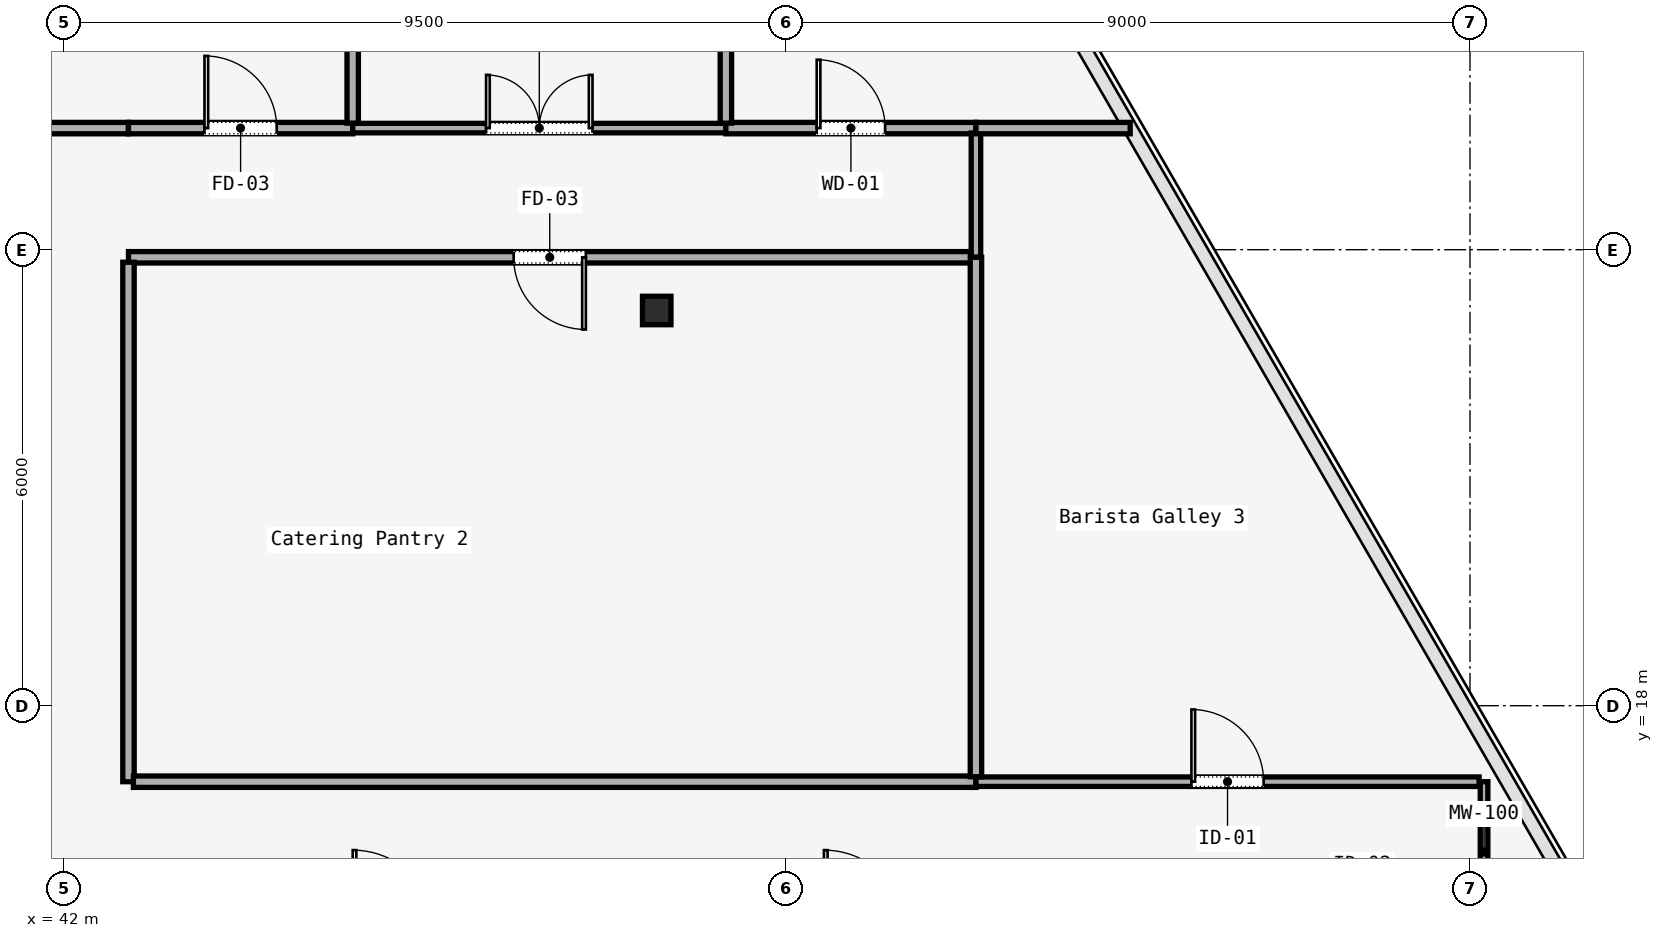
"""IFC4 building model, lengths in metres.
Left out: names, types, materials, properties, quantities, classifications, styles, units other than length and angle.
Written with IfcOpenShell. Run it as: python <this file> out.ifc"""

import sys

from ifc_helpers import new_model, si_unit, direction, frame, frame_2d, origin, origin_2d, place, context, subcontext, project, spatial, rectangle, i_section, extrude, element, fill, save


model = new_model("IFC4")
c1 = context("Model", 3, precision=1e-05, world=origin(), true_north=direction((0.0, 1.0)))
c2 = subcontext(c1, "Body", "Model", "MODEL_VIEW")
j1 = project(units=[si_unit("LENGTHUNIT", "METRE"), si_unit("PLANEANGLEUNIT", "RADIAN")], contexts=[c1])
p1 = place(None, origin())
s1 = spatial("IfcSite", under=j1, at=p1, CompositionType="ELEMENT")
p2 = place(p1, origin())
s2 = spatial("IfcBuilding", under=s1, at=p2, CompositionType="ELEMENT")
p3 = place(p2, frame((0.0, 0.0, 252.2)))
s3 = spatial("IfcBuildingStorey", under=s2, at=p3, CompositionType="ELEMENT", Elevation=252.2)
p4 = place(p3, frame((49.8, 23.2, 0.0), z_axis=(0.0, 0.0, 1.0), x_axis=(1.0, 0.0, 0.0)))
e1 = element("IfcColumn", 1, at=p4, inside=s3, PredefinedType="COLUMN", context=c2, shape_type="SweptSolid", body=[
    extrude(i_section(OverallWidth=0.375, OverallDepth=0.375, WebThickness=0.017, FlangeThickness=0.027, FilletRadius=0.015, at=origin_2d()), origin(), (0.0, 0.0, 1.0), 3.58),
])
p5 = place(p3, frame((60.685, 17.0, 0.0), z_axis=(0.0, 0.0, 1.0), x_axis=(0.0, -1.0, 0.0)))
e2 = element("IfcWall", 2, at=p5, inside=s3, PredefinedType="MOVABLE", context=c2, shape_type="SweptSolid", body=[
    extrude(rectangle(XDim=1.85, YDim=0.1, at=frame_2d((0.925, 0.0))), origin(), (0.0, 0.0, 1.0), 3.01),
])
p6 = place(p3, frame((41.624, 25.6, 0.0), z_axis=(0.0, 0.0, 1.0), x_axis=(1.0, 0.0, 0.0)))
e3 = element("IfcWall", 3, at=p6, inside=s3, PredefinedType="PARTITIONING", context=c2, shape_type="SweptSolid", body=[
    extrude(rectangle(XDim=1.226, YDim=0.15, at=frame_2d((0.613, 0.0))), origin(), (0.0, 0.0, 1.0), 3.01),
])
p7 = place(p3, frame((42.85, 25.6, 0.0), z_axis=(0.0, 0.0, 1.0), x_axis=(1.0, 0.0, 0.0)))
e4 = element("IfcWall", 4, at=p7, inside=s3, PredefinedType="PARTITIONING", context=c2, shape_type="SweptSolid", body=[
    extrude(rectangle(XDim=2.95, YDim=0.15, at=frame_2d((1.475, 0.0))), origin(), (0.0, 0.0, 1.0), 3.01),
])
p8 = place(p7, frame((1.0, 0.0, 0.0)))
e5 = element("IfcOpeningElement", 5, at=p8, cuts=e4, PredefinedType="OPENING", context=c2, shape_type="SweptSolid", body=[
    extrude(rectangle(XDim=0.95, YDim=2.2, at=frame_2d((0.475, 1.1))), frame((0.0, 0.075, 0.0), z_axis=(0.0, -1.0, 0.0), x_axis=(1.0, 0.0, 0.0)), (0.0, 0.0, 1.0), 0.15),
])
p9 = place(p3, frame((45.8, 25.6, 0.0), z_axis=(0.0, 0.0, 1.0), x_axis=(1.0, 0.0, 0.0)))
e6 = element("IfcWall", 6, at=p9, inside=s3, PredefinedType="PARTITIONING", context=c2, shape_type="SweptSolid", body=[
    extrude(rectangle(XDim=4.91, YDim=0.125, at=frame_2d((2.455, 0.0))), origin(), (0.0, 0.0, 1.0), 3.01),
])
p10 = place(p9, frame((1.755, 0.0, 0.0)))
e7 = element("IfcOpeningElement", 7, at=p10, cuts=e6, PredefinedType="OPENING", context=c2, shape_type="SweptSolid", body=[
    extrude(rectangle(XDim=1.4, YDim=2.2, at=frame_2d((0.7, 1.1))), frame((0.0, 0.062, 0.0), z_axis=(0.0, -1.0, 0.0), x_axis=(1.0, 0.0, 0.0)), (0.0, 0.0, 1.0), 0.125),
])
p11 = place(p3, frame((50.71, 25.6, 0.0), z_axis=(0.0, 0.0, 1.0), x_axis=(1.0, 0.0, 0.0)))
e8 = element("IfcWall", 8, at=p11, inside=s3, PredefinedType="PARTITIONING", context=c2, shape_type="SweptSolid", body=[
    extrude(rectangle(XDim=3.29, YDim=0.15, at=frame_2d((1.645, 0.0))), origin(), (0.0, 0.0, 1.0), 3.01),
])
p12 = place(p11, frame((1.195, 0.0, 0.0)))
e9 = element("IfcOpeningElement", 9, at=p12, cuts=e8, PredefinedType="OPENING", context=c2, shape_type="SweptSolid", body=[
    extrude(rectangle(XDim=0.9, YDim=2.15, at=frame_2d((0.45, 1.075))), frame((0.0, 0.075, 0.0), z_axis=(0.0, -1.0, 0.0), x_axis=(1.0, 0.0, 0.0)), (0.0, 0.0, 1.0), 0.15),
])
p13 = place(p3, frame((54.0, 25.535, 0.0), z_axis=(0.0, 0.0, 1.0), x_axis=(0.0, -1.0, 0.0)))
e10 = element("IfcWall", 10, at=p13, inside=s3, PredefinedType="PARTITIONING", context=c2, shape_type="SweptSolid", body=[
    extrude(rectangle(XDim=1.635, YDim=0.125, at=frame_2d((0.817, 0.0))), origin(), (0.0, 0.0, 1.0), 3.01),
])
p14 = place(p3, frame((53.935, 23.9, 0.0), z_axis=(0.0, 0.0, 1.0), x_axis=(-1.0, 0.0, 0.0)))
e11 = element("IfcWall", 11, at=p14, inside=s3, PredefinedType="PARTITIONING", context=c2, shape_type="SweptSolid", body=[
    extrude(rectangle(XDim=11.085, YDim=0.15, at=frame_2d((5.542, 0.0))), origin(), (0.0, 0.0, 1.0), 3.01),
])
p15 = place(p14, frame((5.067, 0.0, 0.0)))
e12 = element("IfcOpeningElement", 12, at=p15, cuts=e11, PredefinedType="OPENING", context=c2, shape_type="SweptSolid", body=[
    extrude(rectangle(XDim=0.95, YDim=2.2, at=frame_2d((0.475, 1.1))), frame((0.0, 0.075, 0.0), z_axis=(0.0, -1.0, 0.0), x_axis=(1.0, 0.0, 0.0)), (0.0, 0.0, 1.0), 0.15),
])
p16 = place(p3, frame((42.85, 23.835, 0.0), z_axis=(0.0, 0.0, 1.0), x_axis=(0.0, -1.0, 0.0)))
e13 = element("IfcWall", 13, at=p16, inside=s3, PredefinedType="PARTITIONING", context=c2, shape_type="SweptSolid", body=[
    extrude(rectangle(XDim=6.835, YDim=0.15, at=frame_2d((3.417, 0.0))), origin(), (0.0, 0.0, 1.0), 3.01),
])
p17 = place(p3, frame((42.915, 17.0, 0.0), z_axis=(0.0, 0.0, 1.0), x_axis=(1.0, 0.0, 0.0)))
e14 = element("IfcWall", 14, at=p17, inside=s3, PredefinedType="PARTITIONING", context=c2, shape_type="SweptSolid", body=[
    extrude(rectangle(XDim=11.085, YDim=0.15, at=frame_2d((5.542, 0.0))), origin(), (0.0, 0.0, 1.0), 3.01),
])
p18 = place(p3, frame((54.0, 17.0, 0.0), z_axis=(0.0, 0.0, 1.0), x_axis=(1.0, 0.0, 0.0)))
e15 = element("IfcWall", 15, at=p18, inside=s3, PredefinedType="PARTITIONING", context=c2, shape_type="SweptSolid", body=[
    extrude(rectangle(XDim=6.62, YDim=0.125, at=frame_2d((3.31, 0.0))), origin(), (0.0, 0.0, 1.0), 3.01),
])
p19 = place(p18, frame((2.835, 0.0, 0.0)))
e16 = element("IfcOpeningElement", 16, at=p19, cuts=e15, PredefinedType="OPENING", context=c2, shape_type="SweptSolid", body=[
    extrude(rectangle(XDim=0.95, YDim=2.2, at=frame_2d((0.475, 1.1))), frame((0.0, 0.062, 0.0), z_axis=(0.0, -1.0, 0.0), x_axis=(1.0, 0.0, 0.0)), (0.0, 0.0, 1.0), 0.125),
])
p20 = place(p3, frame((54.0, 23.9, 0.0), z_axis=(0.0, 0.0, 1.0), x_axis=(0.0, -1.0, 0.0)))
e17 = element("IfcWall", 17, at=p20, inside=s3, PredefinedType="PARTITIONING", context=c2, shape_type="SweptSolid", body=[
    extrude(rectangle(XDim=6.835, YDim=0.15, at=frame_2d((3.417, 0.0))), origin(), (0.0, 0.0, 1.0), 3.01),
])
p21 = place(p3, frame((54.0, 25.6, 0.0), z_axis=(0.0, 0.0, 1.0), x_axis=(1.0, 0.0, 0.0)))
e18 = element("IfcWall", 18, at=p21, inside=s3, PredefinedType="PARTITIONING", context=c2, shape_type="SweptSolid", body=[
    extrude(rectangle(XDim=2.029, YDim=0.15, at=frame_2d((1.015, 0.0))), origin(), (0.0, 0.0, 1.0), 3.01),
])
p22 = place(p3, frame((50.71, 25.665, 0.0), z_axis=(0.0, 0.0, 1.0), x_axis=(0.0, 1.0, 0.0)))
e19 = element("IfcWall", 19, at=p22, inside=s3, PredefinedType="PARTITIONING", context=c2, shape_type="SweptSolid", body=[
    extrude(rectangle(XDim=9.148, YDim=0.15, at=frame_2d((4.574, 0.0))), origin(), (0.0, 0.0, 1.0), 3.01),
])
p23 = place(p3, frame((45.8, 25.665, 0.0), z_axis=(0.0, 0.0, 1.0), x_axis=(0.0, 1.0, 0.0)))
e20 = element("IfcWall", 20, at=p23, inside=s3, PredefinedType="PARTITIONING", context=c2, shape_type="SweptSolid", body=[
    extrude(rectangle(XDim=17.653, YDim=0.15, at=frame_2d((8.826, 0.0))), origin(), (0.0, 0.0, 1.0), 3.01),
])
p24 = place(p15, origin())
e21 = element("IfcDoor", 21, at=p24, inside=s3, OperationType="SINGLE_SWING_RIGHT", PredefinedType="DOOR", context=c2, shape_type="SweptSolid", body=[
    extrude(rectangle(XDim=0.95, YDim=2.2, at=frame_2d((0.475, 1.1))), frame((0.0, 0.025, 0.0), z_axis=(0.0, -1.0, 0.0), x_axis=(1.0, 0.0, 0.0)), (0.0, 0.0, 1.0), 0.05),
])
fill(e12, e21)
p25 = place(p19, origin())
e22 = element("IfcDoor", 22, at=p25, inside=s3, OperationType="SINGLE_SWING_LEFT", PredefinedType="DOOR", context=c2, shape_type="SweptSolid", body=[
    extrude(rectangle(XDim=0.95, YDim=2.2, at=frame_2d((0.475, 1.1))), frame((0.0, 0.025, 0.0), z_axis=(0.0, -1.0, 0.0), x_axis=(1.0, 0.0, 0.0)), (0.0, 0.0, 1.0), 0.05),
])
fill(e16, e22)
p26 = place(p12, origin())
e23 = element("IfcDoor", 23, at=p26, inside=s3, OperationType="SINGLE_SWING_LEFT", PredefinedType="DOOR", context=c2, shape_type="SweptSolid", body=[
    extrude(rectangle(XDim=0.9, YDim=2.15, at=frame_2d((0.45, 1.075))), frame((0.0, 0.025, 0.0), z_axis=(0.0, -1.0, 0.0), x_axis=(1.0, 0.0, 0.0)), (0.0, 0.0, 1.0), 0.05),
])
fill(e9, e23)
p27 = place(p10, origin())
e24 = element("IfcDoor", 24, at=p27, inside=s3, OperationType="SINGLE_SWING_LEFT", PredefinedType="DOOR", context=c2, shape_type="SweptSolid", body=[
    extrude(rectangle(XDim=1.4, YDim=2.2, at=frame_2d((0.7, 1.1))), frame((0.0, 0.025, 0.0), z_axis=(0.0, -1.0, 0.0), x_axis=(1.0, 0.0, 0.0)), (0.0, 0.0, 1.0), 0.05),
])
fill(e7, e24)
p28 = place(p8, origin())
e25 = element("IfcDoor", 25, at=p28, inside=s3, OperationType="SINGLE_SWING_RIGHT", PredefinedType="DOOR", context=c2, shape_type="SweptSolid", body=[
    extrude(rectangle(XDim=0.95, YDim=2.2, at=frame_2d((0.475, 1.1))), frame((0.0, 0.025, 0.0), z_axis=(0.0, -1.0, 0.0), x_axis=(1.0, 0.0, 0.0)), (0.0, 0.0, 1.0), 0.05),
])
fill(e5, e25)
save(model, sys.argv[1])
